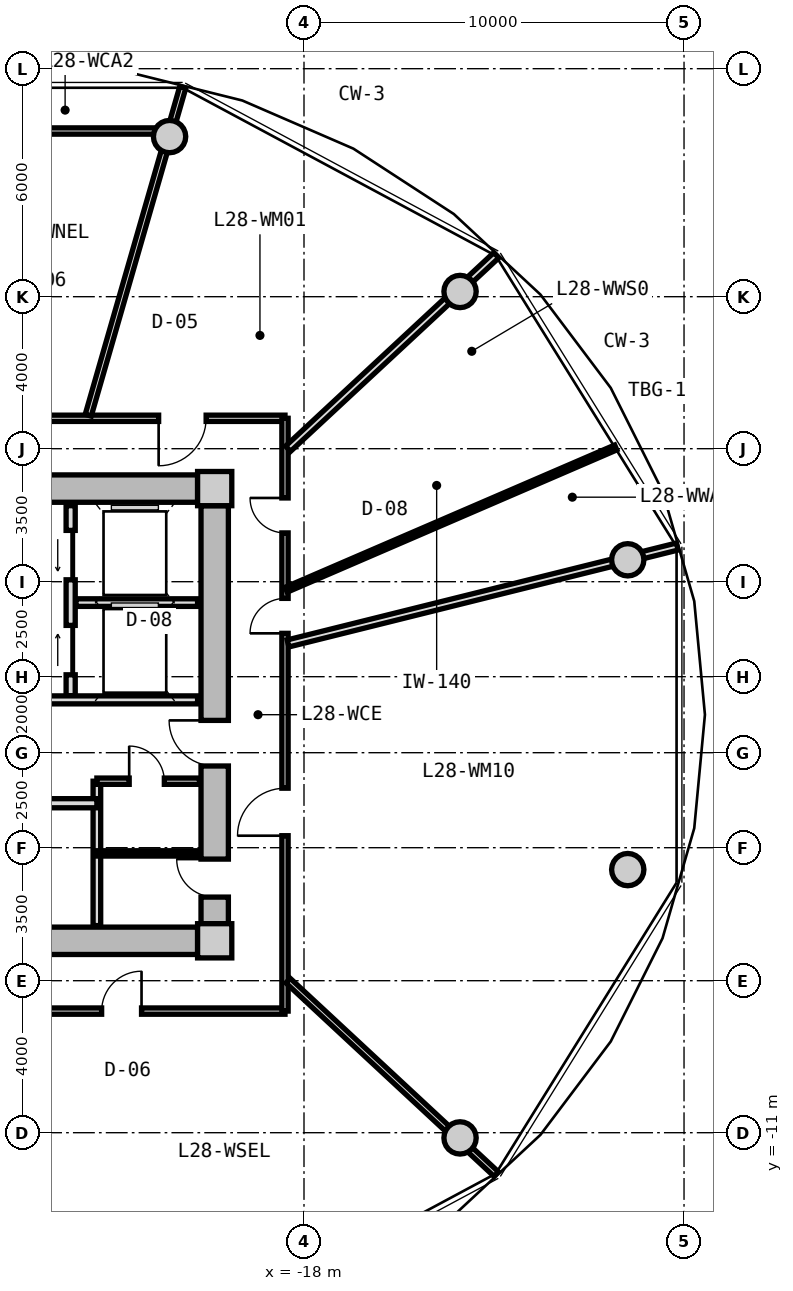
"""IFC4 building model, lengths in metres.
Left out: names, types, materials, properties, quantities, classifications, styles, units other than length and angle.
Written with IfcOpenShell. Run it as: python <this file> out.ifc"""

import sys

from ifc_helpers import new_model, si_unit, direction, frame, frame_2d, origin, origin_2d, place, context, subcontext, project, spatial, rectangle, circle, extrude, source, transform, mapped, element, fill, save


model = new_model("IFC4")
c1 = context("Model", 3, precision=1e-05, world=origin(), true_north=direction((0.0, 1.0)))
c2 = subcontext(c1, "Body", "Model", "MODEL_VIEW")
j1 = project(units=[si_unit("LENGTHUNIT", "METRE"), si_unit("PLANEANGLEUNIT", "RADIAN")], contexts=[c1])
p1 = place(None, origin())
s1 = spatial("IfcSite", under=j1, at=p1, CompositionType="ELEMENT")
p2 = place(p1, origin())
s2 = spatial("IfcBuilding", under=s1, at=p2, CompositionType="ELEMENT")
p3 = place(p2, frame((0.0, 0.0, 93.2)))
s3 = spatial("IfcBuildingStorey", under=s2, at=p3, CompositionType="ELEMENT", Elevation=93.2)
m1 = source(origin(), c2, "Body", "SweptSolid", [
    extrude(rectangle(XDim=0.9, YDim=0.9, at=origin_2d()), origin(), (0.0, 0.0, 1.0), 3.05),
])
for number, where, z_axis, x_axis in (
    (1, (-20.35, -5.95, 0.0), (0.0, 0.0, 1.0), (1.0, 0.0, 0.0)),
    (2, (-20.35, 5.95, 0.0), (0.0, 0.0, 1.0), (1.0, 0.0, 0.0)),
):
    element("IfcColumn", number, at=place(p3, frame(where, z_axis=z_axis, x_axis=x_axis)), inside=s3, PredefinedType="COLUMN", context=c2, shape_type="MappedRepresentation", body=[
        mapped(m1, transform((0.0, 0.0, 0.0), x_axis=(1.0, 0.0, 0.0), y_axis=(0.0, 1.0, 0.0), z_axis=(0.0, 0.0, 1.0), scale=1.0)),
    ])
m2 = source(origin(), c2, "Body", "SweptSolid", [
    extrude(rectangle(XDim=14.4, YDim=0.72, at=frame_2d((7.2, 0.0))), origin(), (0.0, 0.0, 1.0), 2.79),
])
for number, where, z_axis, x_axis in (
    (3, (-35.2, 5.95, 0.0), (0.0, 0.0, 1.0), (1.0, 0.0, 0.0)),
    (4, (-20.8, -5.95, 0.0), (0.0, 0.0, 1.0), (-1.0, 0.0, 0.0)),
):
    element("IfcWall", number, at=place(p3, frame(where, z_axis=z_axis, x_axis=x_axis)), inside=s3, PredefinedType="SHEAR", context=c2, shape_type="MappedRepresentation", body=[
        mapped(m2, transform((0.0, 0.0, 0.0), x_axis=(1.0, 0.0, 0.0), y_axis=(0.0, 1.0, 0.0), z_axis=(0.0, 0.0, 1.0), scale=1.0)),
    ])
m3 = source(origin(), c2, "Body", "SweptSolid", [
    extrude(rectangle(XDim=11.0, YDim=0.72, at=frame_2d((5.5, 0.0))), origin(), (0.0, 0.0, 1.0), 2.79),
])
p4 = place(p3, frame((-20.35, 5.5, 0.0), z_axis=(0.0, 0.0, 1.0), x_axis=(0.0, -1.0, 0.0)))
e5 = element("IfcWall", 5, at=p4, inside=s3, PredefinedType="SHEAR", context=c2, shape_type="MappedRepresentation", body=[
    mapped(m3, transform((0.0, 0.0, 0.0), x_axis=(1.0, 0.0, 0.0), y_axis=(0.0, 1.0, 0.0), z_axis=(0.0, 0.0, 1.0), scale=1.0)),
])
p5 = place(p4, frame((5.65, 0.0, 0.0)))
e6 = element("IfcOpeningElement", 6, at=p5, cuts=e5, PredefinedType="OPENING", context=c2, shape_type="SweptSolid", body=[
    extrude(rectangle(XDim=1.2, YDim=2.15, at=frame_2d((0.6, 1.075))), frame((0.0, 0.37, 0.0), z_axis=(0.0, -1.0, 0.0), x_axis=(1.0, 0.0, 0.0)), (0.0, 0.0, 1.0), 0.74),
])
p6 = place(p4, frame((9.3, 0.0, 0.0)))
e7 = element("IfcOpeningElement", 7, at=p6, cuts=e5, PredefinedType="OPENING", context=c2, shape_type="SweptSolid", body=[
    extrude(rectangle(XDim=1.0, YDim=2.1, at=frame_2d((0.5, 1.05))), frame((0.0, 0.37, 0.0), z_axis=(0.0, -1.0, 0.0), x_axis=(1.0, 0.0, 0.0)), (0.0, 0.0, 1.0), 0.74),
])
m4 = source(origin(), c2, "Body", "SweptSolid", [
    extrude(circle(Radius=0.425, at=origin_2d()), origin(), (0.0, 0.0, 1.0), 3.05),
])
for number, where, z_axis, x_axis in (
    (8, (-9.481, 4.076, 0.0), (0.0, 0.0, 1.0), (1.0, 0.0, 0.0)),
    (9, (-13.894, 11.137, 0.0), (0.0, 0.0, 1.0), (1.0, 0.0, 0.0)),
    (10, (-21.537, 15.213, 0.0), (0.0, 0.0, 1.0), (1.0, 0.0, 0.0)),
    (11, (-13.894, -11.137, 0.0), (0.0, 0.0, 1.0), (1.0, 0.0, 0.0)),
    (12, (-9.481, -4.076, 0.0), (0.0, 0.0, 1.0), (1.0, 0.0, 0.0)),
):
    element("IfcColumn", number, at=place(p3, frame(where, z_axis=z_axis, x_axis=x_axis)), inside=s3, PredefinedType="COLUMN", context=c2, shape_type="MappedRepresentation", body=[
        mapped(m4, transform((0.0, 0.0, 0.0), x_axis=(1.0, 0.0, 0.0), y_axis=(0.0, 1.0, 0.0), z_axis=(0.0, 0.0, 1.0), scale=1.0)),
    ])
m5 = source(origin(), c2, "Body", "SweptSolid", [
    extrude(rectangle(XDim=5.0, YDim=0.24, at=frame_2d((2.5, 0.0))), origin(), (0.0, 0.0, 1.0), 2.775),
])
p7 = place(p3, frame((-24.14, 0.5, 0.0), z_axis=(0.0, 0.0, 1.0), x_axis=(0.0, 1.0, 0.0)))
e13 = element("IfcWall", 13, at=p7, inside=s3, PredefinedType="PARTITIONING", context=c2, shape_type="MappedRepresentation", body=[
    mapped(m5, transform((0.0, 0.0, 0.0), x_axis=(1.0, 0.0, 0.0), y_axis=(0.0, 1.0, 0.0), z_axis=(0.0, 0.0, 1.0), scale=1.0)),
])
p8 = place(p7, frame((3.05, 0.0, 0.0)))
e14 = element("IfcOpeningElement", 14, at=p8, cuts=e13, PredefinedType="OPENING", context=c2, shape_type="SweptSolid", body=[
    extrude(rectangle(XDim=1.3, YDim=2.2, at=frame_2d((0.65, 1.1))), frame((0.0, 0.13, 0.0), z_axis=(0.0, -1.0, 0.0), x_axis=(1.0, 0.0, 0.0)), (0.0, 0.0, 1.0), 0.26),
])
p9 = place(p7, frame((0.55, 0.0, 0.0)))
e15 = element("IfcOpeningElement", 15, at=p9, cuts=e13, PredefinedType="OPENING", context=c2, shape_type="SweptSolid", body=[
    extrude(rectangle(XDim=1.3, YDim=2.2, at=frame_2d((0.65, 1.1))), frame((0.0, 0.13, 0.0), z_axis=(0.0, -1.0, 0.0), x_axis=(1.0, 0.0, 0.0)), (0.0, 0.0, 1.0), 0.26),
])
m6 = source(origin(), c2, "Body", "SweptSolid", [
    extrude(rectangle(XDim=3.2, YDim=0.2, at=frame_2d((1.6, 0.0))), origin(), (0.0, 0.0, 1.0), 2.775),
])
p10 = place(p3, frame((-24.0, 2.95, 0.0), z_axis=(0.0, 0.0, 1.0), x_axis=(1.0, 0.0, 0.0)))
e16 = element("IfcWall", 16, at=p10, inside=s3, PredefinedType="PARTITIONING", context=c2, shape_type="MappedRepresentation", body=[
    mapped(m6, transform((0.0, 0.0, 0.0), x_axis=(1.0, 0.0, 0.0), y_axis=(0.0, 1.0, 0.0), z_axis=(0.0, 0.0, 1.0), scale=1.0)),
])
m7 = source(origin(), c2, "Body", "SweptSolid", [
    extrude(rectangle(XDim=6.66, YDim=0.21, at=frame_2d((3.33, 0.0))), origin(), (0.0, 0.0, 1.0), 2.775),
])
p11 = place(p3, frame((-27.46, 0.39, 0.0), z_axis=(0.0, 0.0, 1.0), x_axis=(1.0, 0.0, 0.0)))
e17 = element("IfcWall", 17, at=p11, inside=s3, PredefinedType="PARTITIONING", context=c2, shape_type="MappedRepresentation", body=[
    mapped(m7, transform((0.0, 0.0, 0.0), x_axis=(1.0, 0.0, 0.0), y_axis=(0.0, 1.0, 0.0), z_axis=(0.0, 0.0, 1.0), scale=1.0)),
])
p12 = place(p11, frame((1.0, 0.0, 0.0)))
e18 = element("IfcOpeningElement", 18, at=p12, cuts=e17, PredefinedType="OPENING", context=c2, shape_type="SweptSolid", body=[
    extrude(rectangle(XDim=1.2, YDim=2.15, at=frame_2d((0.6, 1.075))), frame((0.0, 0.115, 0.0), z_axis=(0.0, -1.0, 0.0), x_axis=(1.0, 0.0, 0.0)), (0.0, 0.0, 1.0), 0.23),
])
m8 = source(origin(), c2, "Body", "SweptSolid", [
    extrude(rectangle(XDim=3.8, YDim=0.2, at=frame_2d((1.9, 0.0))), origin(), (0.0, 0.0, 1.0), 2.775),
])
p13 = place(p3, frame((-23.45, -5.55, 0.0), z_axis=(0.0, 0.0, 1.0), x_axis=(0.0, 1.0, 0.0)))
e19 = element("IfcWall", 19, at=p13, inside=s3, PredefinedType="PARTITIONING", context=c2, shape_type="MappedRepresentation", body=[
    mapped(m8, transform((0.0, 0.0, 0.0), x_axis=(1.0, 0.0, 0.0), y_axis=(0.0, 1.0, 0.0), z_axis=(0.0, 0.0, 1.0), scale=1.0)),
])
m9 = source(origin(), c2, "Body", "SweptSolid", [
    extrude(rectangle(XDim=4.13, YDim=0.24, at=frame_2d((2.065, 0.0))), origin(), (0.0, 0.0, 1.0), 2.775),
])
p14 = place(p3, frame((-27.58, -2.33, 0.0), z_axis=(0.0, 0.0, 1.0), x_axis=(1.0, 0.0, 0.0)))
e20 = element("IfcWall", 20, at=p14, inside=s3, PredefinedType="PARTITIONING", context=c2, shape_type="MappedRepresentation", body=[
    mapped(m9, transform((0.0, 0.0, 0.0), x_axis=(1.0, 0.0, 0.0), y_axis=(0.0, 1.0, 0.0), z_axis=(0.0, 0.0, 1.0), scale=1.0)),
])
p15 = place(p14, frame((0.5, 0.0, 0.0)))
e21 = element("IfcOpeningElement", 21, at=p15, cuts=e20, PredefinedType="OPENING", context=c2, shape_type="SweptSolid", body=[
    extrude(rectangle(XDim=1.1, YDim=2.2, at=frame_2d((0.55, 1.1))), frame((0.0, 0.13, 0.0), z_axis=(0.0, -1.0, 0.0), x_axis=(1.0, 0.0, 0.0)), (0.0, 0.0, 1.0), 0.26),
])
m10 = source(origin(), c2, "Body", "SweptSolid", [
    extrude(rectangle(XDim=2.7, YDim=0.165, at=frame_2d((1.35, 0.0))), origin(), (0.0, 0.0, 1.0), 2.775),
])
p16 = place(p3, frame((-23.45, -1.75, 0.0), z_axis=(0.0, 0.0, 1.0), x_axis=(1.0, 0.0, 0.0)))
e22 = element("IfcWall", 22, at=p16, inside=s3, PredefinedType="PARTITIONING", context=c2, shape_type="MappedRepresentation", body=[
    mapped(m10, transform((0.0, 0.0, 0.0), x_axis=(1.0, 0.0, 0.0), y_axis=(0.0, 1.0, 0.0), z_axis=(0.0, 0.0, 1.0), scale=1.0)),
])
p17 = place(p16, frame((0.85, 0.0, 0.0)))
e23 = element("IfcOpeningElement", 23, at=p17, cuts=e22, PredefinedType="OPENING", context=c2, shape_type="SweptSolid", body=[
    extrude(rectangle(XDim=0.925, YDim=2.1, at=frame_2d((0.462, 1.05))), frame((0.0, 0.093, 0.0), z_axis=(0.0, -1.0, 0.0), x_axis=(1.0, 0.0, 0.0)), (0.0, 0.0, 1.0), 0.185),
])
m11 = source(origin(), c2, "Body", "SweptSolid", [
    extrude(rectangle(XDim=2.7, YDim=0.14, at=frame_2d((1.35, 0.0))), origin(), (0.0, 0.0, 1.0), 2.775),
])
p18 = place(p3, frame((-23.45, -3.65, 0.0), z_axis=(0.0, 0.0, 1.0), x_axis=(1.0, 0.0, 0.0)))
e24 = element("IfcWall", 24, at=p18, inside=s3, PredefinedType="PARTITIONING", context=c2, shape_type="MappedRepresentation", body=[
    mapped(m11, transform((0.0, 0.0, 0.0), x_axis=(1.0, 0.0, 0.0), y_axis=(0.0, 1.0, 0.0), z_axis=(0.0, 0.0, 1.0), scale=1.0)),
])
m12 = source(origin(), c2, "Body", "SweptSolid", [
    extrude(rectangle(XDim=8.6, YDim=0.165, at=frame_2d((4.3, 0.0))), origin(), (0.0, 0.0, 1.0), 2.775),
])
p19 = place(p3, frame((-27.1, 7.8, 0.0), z_axis=(0.0, 0.0, 1.0), x_axis=(1.0, 0.0, 0.0)))
e25 = element("IfcWall", 25, at=p19, inside=s3, PredefinedType="PARTITIONING", context=c2, shape_type="MappedRepresentation", body=[
    mapped(m12, transform((0.0, 0.0, 0.0), x_axis=(1.0, 0.0, 0.0), y_axis=(0.0, 1.0, 0.0), z_axis=(0.0, 0.0, 1.0), scale=1.0)),
])
p20 = place(p19, frame((5.275, 0.0, 0.0)))
e26 = element("IfcOpeningElement", 26, at=p20, cuts=e25, PredefinedType="OPENING", context=c2, shape_type="SweptSolid", body=[
    extrude(rectangle(XDim=1.25, YDim=2.2, at=frame_2d((0.625, 1.1))), frame((0.0, 0.093, 0.0), z_axis=(0.0, -1.0, 0.0), x_axis=(1.0, 0.0, 0.0)), (0.0, 0.0, 1.0), 0.185),
])
p21 = place(p3, frame((-18.5, -7.8, 0.0), z_axis=(0.0, 0.0, 1.0), x_axis=(-1.0, 0.0, 0.0)))
e27 = element("IfcWall", 27, at=p21, inside=s3, PredefinedType="PARTITIONING", context=c2, shape_type="MappedRepresentation", body=[
    mapped(m12, transform((0.0, 0.0, 0.0), x_axis=(1.0, 0.0, 0.0), y_axis=(0.0, 1.0, 0.0), z_axis=(0.0, 0.0, 1.0), scale=1.0)),
])
p22 = place(p21, frame((3.775, 0.0, 0.0)))
e28 = element("IfcOpeningElement", 28, at=p22, cuts=e27, PredefinedType="OPENING", context=c2, shape_type="SweptSolid", body=[
    extrude(rectangle(XDim=1.05, YDim=2.15, at=frame_2d((0.525, 1.075))), frame((0.0, 0.093, 0.0), z_axis=(0.0, -1.0, 0.0), x_axis=(1.0, 0.0, 0.0)), (0.0, 0.0, 1.0), 0.185),
])
m13 = source(origin(), c2, "Body", "SweptSolid", [
    extrude(rectangle(XDim=15.6, YDim=0.165, at=frame_2d((7.8, 0.0))), origin(), (0.0, 0.0, 1.0), 2.775),
])
p23 = place(p3, frame((-18.5, 7.8, 0.0), z_axis=(0.0, 0.0, 1.0), x_axis=(0.0, -1.0, 0.0)))
e29 = element("IfcWall", 29, at=p23, inside=s3, PredefinedType="PARTITIONING", context=c2, shape_type="MappedRepresentation", body=[
    mapped(m13, transform((0.0, 0.0, 0.0), x_axis=(1.0, 0.0, 0.0), y_axis=(0.0, 1.0, 0.0), z_axis=(0.0, 0.0, 1.0), scale=1.0)),
])
p24 = place(p23, frame((9.734, 0.0, 0.0)))
e30 = element("IfcOpeningElement", 30, at=p24, cuts=e29, PredefinedType="OPENING", context=c2, shape_type="SweptSolid", body=[
    extrude(rectangle(XDim=1.25, YDim=2.2, at=frame_2d((0.625, 1.1))), frame((0.0, 0.093, 0.0), z_axis=(0.0, -1.0, 0.0), x_axis=(1.0, 0.0, 0.0)), (0.0, 0.0, 1.0), 0.185),
])
p25 = place(p23, frame((4.739, 0.0, 0.0)))
e31 = element("IfcOpeningElement", 31, at=p25, cuts=e29, PredefinedType="OPENING", context=c2, shape_type="SweptSolid", body=[
    extrude(rectangle(XDim=0.92, YDim=2.1, at=frame_2d((0.46, 1.05))), frame((0.0, 0.093, 0.0), z_axis=(0.0, -1.0, 0.0), x_axis=(1.0, 0.0, 0.0)), (0.0, 0.0, 1.0), 0.185),
])
p26 = place(p23, frame((2.096, 0.0, 0.0)))
e32 = element("IfcOpeningElement", 32, at=p26, cuts=e29, PredefinedType="OPENING", context=c2, shape_type="SweptSolid", body=[
    extrude(rectangle(XDim=0.92, YDim=2.1, at=frame_2d((0.46, 1.05))), frame((0.0, 0.093, 0.0), z_axis=(0.0, -1.0, 0.0), x_axis=(1.0, 0.0, 0.0)), (0.0, 0.0, 1.0), 0.185),
])
m14 = source(origin(), c2, "Body", "SweptSolid", [
    extrude(rectangle(XDim=8.989, YDim=0.165, at=frame_2d((4.495, 0.0))), origin(), (0.0, 0.0, 1.0), 2.275),
])
p27 = place(p3, frame((-23.678, 7.88, 0.0), z_axis=(0.0, 0.0, 1.0), x_axis=(0.27702323008, 0.960863221274, 0.0)))
e33 = element("IfcWall", 33, at=p27, inside=s3, PredefinedType="PARTITIONING", context=c2, shape_type="MappedRepresentation", body=[
    mapped(m14, transform((0.0, 0.0, 0.0), x_axis=(1.0, 0.0, 0.0), y_axis=(0.0, 1.0, 0.0), z_axis=(0.0, 0.0, 1.0), scale=1.0)),
])
m15 = source(origin(), c2, "Body", "SweptSolid", [
    extrude(rectangle(XDim=7.482, YDim=0.165, at=frame_2d((3.741, 0.0))), origin(), (0.0, 0.0, 1.0), 2.275),
])
p28 = place(p3, frame((-18.42, -6.998, 0.0), z_axis=(0.0, 0.0, 1.0), x_axis=(0.732508698043, -0.680757671489, 0.0)))
e34 = element("IfcWall", 34, at=p28, inside=s3, PredefinedType="PARTITIONING", context=c2, shape_type="MappedRepresentation", body=[
    mapped(m15, transform((0.0, 0.0, 0.0), x_axis=(1.0, 0.0, 0.0), y_axis=(0.0, 1.0, 0.0), z_axis=(0.0, 0.0, 1.0), scale=1.0)),
])
m16 = source(origin(), c2, "Body", "SweptSolid", [
    extrude(rectangle(XDim=5.814, YDim=0.165, at=frame_2d((2.907, 0.0))), origin(), (0.0, 0.0, 1.0), 2.275),
])
p29 = place(p3, frame((-27.18, 15.36, 0.0), z_axis=(0.0, 0.0, 1.0), x_axis=(1.0, 0.0, 0.0)))
e35 = element("IfcWall", 35, at=p29, inside=s3, PredefinedType="PARTITIONING", context=c2, shape_type="MappedRepresentation", body=[
    mapped(m16, transform((0.0, 0.0, 0.0), x_axis=(1.0, 0.0, 0.0), y_axis=(0.0, 1.0, 0.0), z_axis=(0.0, 0.0, 1.0), scale=1.0)),
])
m17 = source(origin(), c2, "Body", "SweptSolid", [
    extrude(rectangle(XDim=10.556, YDim=0.19, at=frame_2d((5.278, 0.0))), origin(), (0.0, 0.0, 1.0), 2.275),
])
p30 = place(p3, frame((-18.42, 1.875, 0.0), z_axis=(0.0, 0.0, 1.0), x_axis=(0.970363857851, 0.241648470667, 0.0)))
e36 = element("IfcWall", 36, at=p30, inside=s3, PredefinedType="PARTITIONING", context=c2, shape_type="MappedRepresentation", body=[
    mapped(m17, transform((0.0, 0.0, 0.0), x_axis=(1.0, 0.0, 0.0), y_axis=(0.0, 1.0, 0.0), z_axis=(0.0, 0.0, 1.0), scale=1.0)),
])
m18 = source(origin(), c2, "Body", "SweptSolid", [
    extrude(rectangle(XDim=7.482, YDim=0.19, at=frame_2d((3.741, 0.0))), origin(), (0.0, 0.0, 1.0), 2.275),
])
p31 = place(p3, frame((-18.42, 6.998, 0.0), z_axis=(0.0, 0.0, 1.0), x_axis=(0.732508698043, 0.680757671489, 0.0)))
e37 = element("IfcWall", 37, at=p31, inside=s3, PredefinedType="PARTITIONING", context=c2, shape_type="MappedRepresentation", body=[
    mapped(m18, transform((0.0, 0.0, 0.0), x_axis=(1.0, 0.0, 0.0), y_axis=(0.0, 1.0, 0.0), z_axis=(0.0, 0.0, 1.0), scale=1.0)),
])
m19 = source(origin(), c2, "Body", "SweptSolid", [
    extrude(rectangle(XDim=9.447, YDim=0.14, at=frame_2d((4.724, 0.0))), origin(), (0.0, 0.0, 1.0), 2.775),
])
p32 = place(p3, frame((-18.47, 3.289, 0.0), z_axis=(0.0, 0.0, 1.0), x_axis=(0.918162367414, 0.396204324894, 0.0)))
e38 = element("IfcWall", 38, at=p32, inside=s3, PredefinedType="PARTITIONING", context=c2, shape_type="MappedRepresentation", body=[
    mapped(m19, transform((0.0, 0.0, 0.0), x_axis=(1.0, 0.0, 0.0), y_axis=(0.0, 1.0, 0.0), z_axis=(0.0, 0.0, 1.0), scale=1.0)),
])
m20 = source(origin(), c2, "Body", "SweptSolid", [
    extrude(rectangle(XDim=1.3, YDim=2.2, at=frame_2d((0.65, 1.1))), frame((0.0, 0.025, 0.0), z_axis=(0.0, -1.0, 0.0), x_axis=(1.0, 0.0, 0.0)), (0.0, 0.0, 1.0), 0.05),
])
p33 = place(p8, origin())
e39 = element("IfcDoor", 39, at=p33, inside=s3, OperationType="SLIDING_TO_LEFT", PredefinedType="DOOR", context=c2, shape_type="MappedRepresentation", body=[
    mapped(m20, transform((0.0, 0.0, 0.0), x_axis=(1.0, 0.0, 0.0), y_axis=(0.0, 1.0, 0.0), z_axis=(0.0, 0.0, 1.0), scale=1.0)),
])
fill(e14, e39)
p34 = place(p9, origin())
e40 = element("IfcDoor", 40, at=p34, inside=s3, OperationType="SLIDING_TO_RIGHT", PredefinedType="DOOR", context=c2, shape_type="MappedRepresentation", body=[
    mapped(m20, transform((0.0, 0.0, 0.0), x_axis=(1.0, 0.0, 0.0), y_axis=(0.0, 1.0, 0.0), z_axis=(0.0, 0.0, 1.0), scale=1.0)),
])
fill(e15, e40)
m21 = source(origin(), c2, "Body", "SweptSolid", [
    extrude(rectangle(XDim=1.2, YDim=2.15, at=frame_2d((0.6, 1.075))), frame((0.0, 0.025, 0.0), z_axis=(0.0, -1.0, 0.0), x_axis=(1.0, 0.0, 0.0)), (0.0, 0.0, 1.0), 0.05),
])
p35 = place(p5, frame((1.2, 0.0, 0.0), z_axis=(0.0, 0.0, 1.0), x_axis=(-1.0, 0.0, 0.0)))
e41 = element("IfcDoor", 41, at=p35, inside=s3, OperationType="SINGLE_SWING_RIGHT", PredefinedType="DOOR", context=c2, shape_type="MappedRepresentation", body=[
    mapped(m21, transform((0.0, 0.0, 0.0), x_axis=(1.0, 0.0, 0.0), y_axis=(0.0, 1.0, 0.0), z_axis=(0.0, 0.0, 1.0), scale=1.0)),
])
fill(e6, e41)
m22 = source(origin(), c2, "Body", "SweptSolid", [
    extrude(rectangle(XDim=0.925, YDim=2.1, at=frame_2d((0.462, 1.05))), frame((0.0, 0.025, 0.0), z_axis=(0.0, -1.0, 0.0), x_axis=(1.0, 0.0, 0.0)), (0.0, 0.0, 1.0), 0.05),
])
p36 = place(p17, origin())
e42 = element("IfcDoor", 42, at=p36, inside=s3, OperationType="SINGLE_SWING_LEFT", PredefinedType="DOOR", context=c2, shape_type="MappedRepresentation", body=[
    mapped(m22, transform((0.0, 0.0, 0.0), x_axis=(1.0, 0.0, 0.0), y_axis=(0.0, 1.0, 0.0), z_axis=(0.0, 0.0, 1.0), scale=1.0)),
])
fill(e23, e42)
m23 = source(origin(), c2, "Body", "SweptSolid", [
    extrude(rectangle(XDim=1.0, YDim=2.1, at=frame_2d((0.5, 1.05))), frame((0.0, 0.025, 0.0), z_axis=(0.0, -1.0, 0.0), x_axis=(1.0, 0.0, 0.0)), (0.0, 0.0, 1.0), 0.05),
])
p37 = place(p6, frame((1.0, 0.0, 0.0), z_axis=(0.0, 0.0, 1.0), x_axis=(-1.0, 0.0, 0.0)))
e43 = element("IfcDoor", 43, at=p37, inside=s3, OperationType="SINGLE_SWING_RIGHT", PredefinedType="DOOR", context=c2, shape_type="MappedRepresentation", body=[
    mapped(m23, transform((0.0, 0.0, 0.0), x_axis=(1.0, 0.0, 0.0), y_axis=(0.0, 1.0, 0.0), z_axis=(0.0, 0.0, 1.0), scale=1.0)),
])
fill(e7, e43)
m24 = source(origin(), c2, "Body", "SweptSolid", [
    extrude(rectangle(XDim=1.05, YDim=2.15, at=frame_2d((0.525, 1.075))), frame((0.0, 0.025, 0.0), z_axis=(0.0, -1.0, 0.0), x_axis=(1.0, 0.0, 0.0)), (0.0, 0.0, 1.0), 0.05),
])
p38 = place(p22, frame((1.05, 0.0, 0.0), z_axis=(0.0, 0.0, 1.0), x_axis=(-1.0, 0.0, 0.0)))
e44 = element("IfcDoor", 44, at=p38, inside=s3, OperationType="SINGLE_SWING_RIGHT", PredefinedType="DOOR", context=c2, shape_type="MappedRepresentation", body=[
    mapped(m24, transform((0.0, 0.0, 0.0), x_axis=(1.0, 0.0, 0.0), y_axis=(0.0, 1.0, 0.0), z_axis=(0.0, 0.0, 1.0), scale=1.0)),
])
fill(e28, e44)
m25 = source(origin(), c2, "Body", "SweptSolid", [
    extrude(rectangle(XDim=1.25, YDim=2.2, at=frame_2d((0.625, 1.1))), frame((0.0, 0.025, 0.0), z_axis=(0.0, -1.0, 0.0), x_axis=(1.0, 0.0, 0.0)), (0.0, 0.0, 1.0), 0.05),
])
p39 = place(p24, frame((1.25, 0.0, 0.0), z_axis=(0.0, 0.0, 1.0), x_axis=(-1.0, 0.0, 0.0)))
e45 = element("IfcDoor", 45, at=p39, inside=s3, OperationType="SINGLE_SWING_LEFT", PredefinedType="DOOR", context=c2, shape_type="MappedRepresentation", body=[
    mapped(m25, transform((0.0, 0.0, 0.0), x_axis=(1.0, 0.0, 0.0), y_axis=(0.0, 1.0, 0.0), z_axis=(0.0, 0.0, 1.0), scale=1.0)),
])
fill(e30, e45)
m26 = source(origin(), c2, "Body", "SweptSolid", [
    extrude(rectangle(XDim=0.92, YDim=2.1, at=frame_2d((0.46, 1.05))), frame((0.0, 0.025, 0.0), z_axis=(0.0, -1.0, 0.0), x_axis=(1.0, 0.0, 0.0)), (0.0, 0.0, 1.0), 0.05),
])
p40 = place(p25, frame((0.92, 0.0, 0.0), z_axis=(0.0, 0.0, 1.0), x_axis=(-1.0, 0.0, 0.0)))
e46 = element("IfcDoor", 46, at=p40, inside=s3, OperationType="SINGLE_SWING_LEFT", PredefinedType="DOOR", context=c2, shape_type="MappedRepresentation", body=[
    mapped(m26, transform((0.0, 0.0, 0.0), x_axis=(1.0, 0.0, 0.0), y_axis=(0.0, 1.0, 0.0), z_axis=(0.0, 0.0, 1.0), scale=1.0)),
])
fill(e31, e46)
p41 = place(p26, frame((0.92, 0.0, 0.0), z_axis=(0.0, 0.0, 1.0), x_axis=(-1.0, 0.0, 0.0)))
e47 = element("IfcDoor", 47, at=p41, inside=s3, OperationType="SINGLE_SWING_RIGHT", PredefinedType="DOOR", context=c2, shape_type="MappedRepresentation", body=[
    mapped(m26, transform((0.0, 0.0, 0.0), x_axis=(1.0, 0.0, 0.0), y_axis=(0.0, 1.0, 0.0), z_axis=(0.0, 0.0, 1.0), scale=1.0)),
])
fill(e32, e47)
p42 = place(p20, frame((1.25, 0.0, 0.0), z_axis=(0.0, 0.0, 1.0), x_axis=(-1.0, 0.0, 0.0)))
e48 = element("IfcDoor", 48, at=p42, inside=s3, OperationType="SINGLE_SWING_RIGHT", PredefinedType="DOOR", context=c2, shape_type="MappedRepresentation", body=[
    mapped(m25, transform((0.0, 0.0, 0.0), x_axis=(1.0, 0.0, 0.0), y_axis=(0.0, 1.0, 0.0), z_axis=(0.0, 0.0, 1.0), scale=1.0)),
])
fill(e26, e48)
save(model, sys.argv[1])
